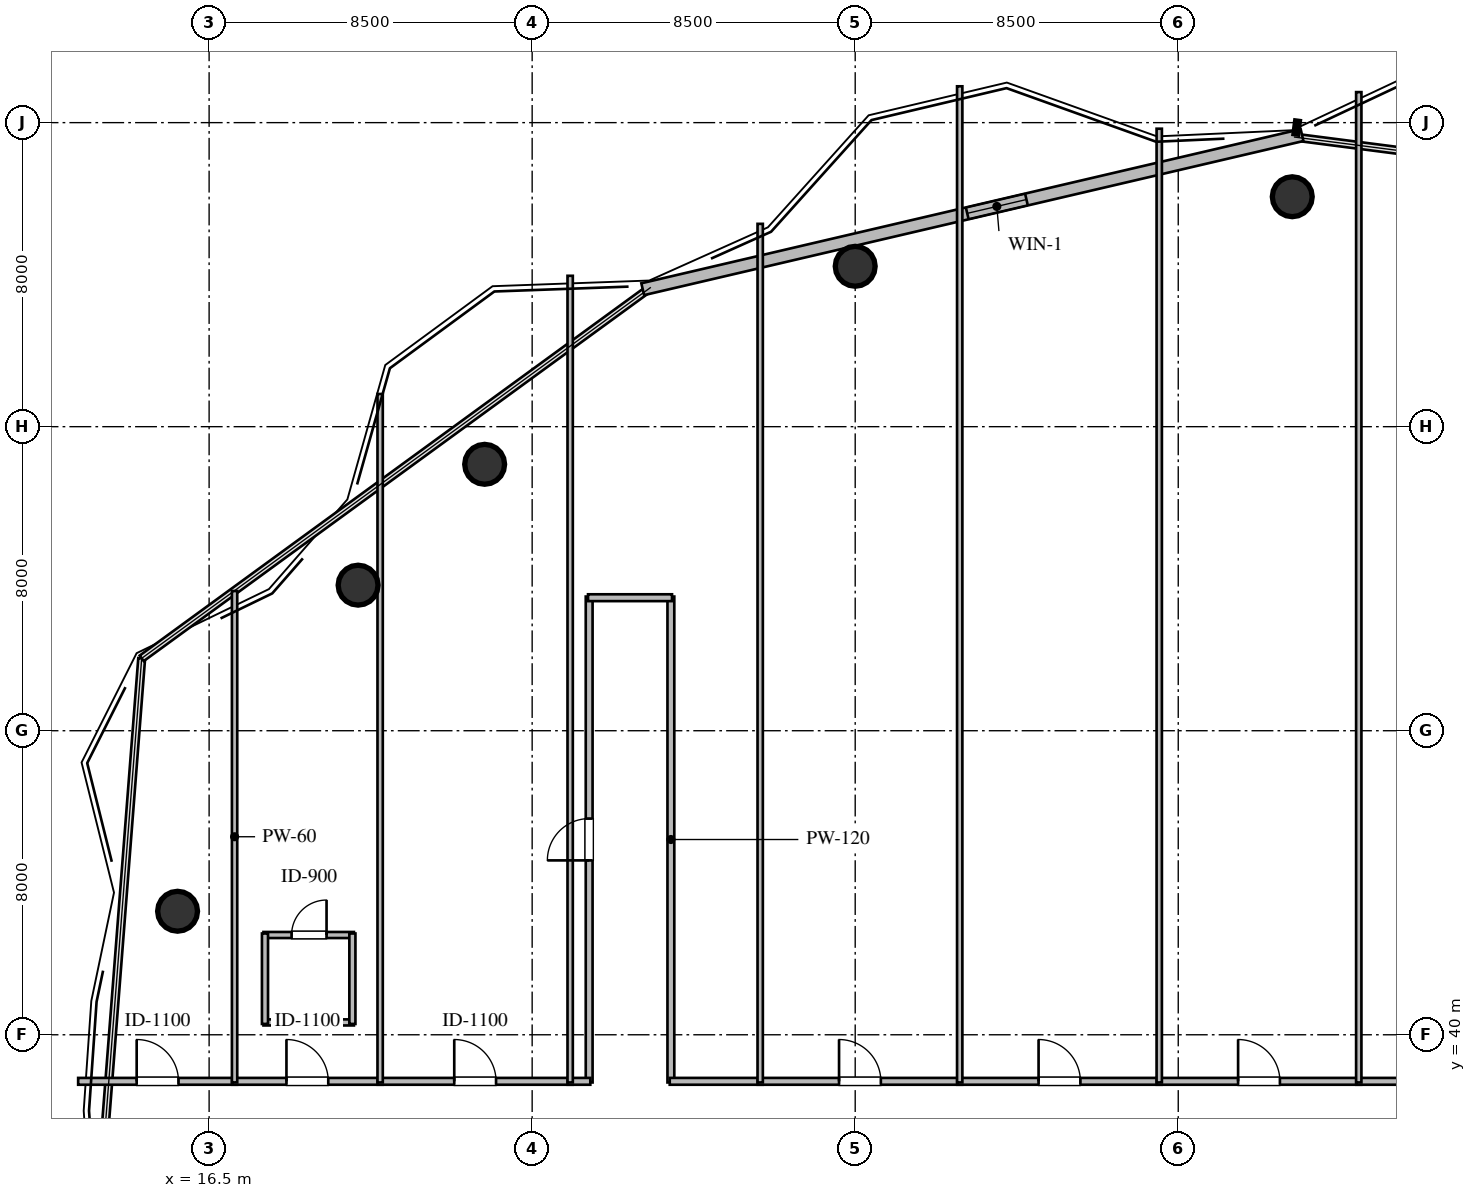
"""IFC4 building model, lengths in metres.
Left out: names, types, materials, properties, quantities, classifications, styles, units other than length and angle.
Written with IfcOpenShell. Run it as: python <this file> out.ifc"""

import sys

from ifc_helpers import new_model, si_unit, direction, frame, frame_2d, origin, origin_2d, place, context, subcontext, project, spatial, rectangle, circle, extrude, element, fill, save


model = new_model("IFC4")
c1 = context("Model", 3, precision=1e-05, world=origin(), true_north=direction((0.0, 1.0)))
c2 = subcontext(c1, "Body", "Model", "MODEL_VIEW")
j1 = project(units=[si_unit("LENGTHUNIT", "METRE"), si_unit("PLANEANGLEUNIT", "RADIAN")], contexts=[c1])
p1 = place(None, origin())
s1 = spatial("IfcSite", under=j1, at=p1, CompositionType="ELEMENT")
p2 = place(p1, origin())
s2 = spatial("IfcBuilding", under=s1, at=p2, CompositionType="ELEMENT")
p3 = place(p2, frame((0.0, 0.0, 202.8)))
s3 = spatial("IfcBuildingStorey", under=s2, at=p3, CompositionType="ELEMENT", Elevation=202.8)
for number, where, z_axis, x_axis in (
    (1, (45.0, 62.05, 0.0), (0.0, 0.0, 1.0), (1.0, 0.0, 0.0)),
    (2, (33.5, 60.22, 0.0), (0.0, 0.0, 1.0), (1.0, 0.0, 0.0)),
    (3, (23.75, 55.01, 0.0), (0.0, 0.0, 1.0), (1.0, 0.0, 0.0)),
    (4, (20.42, 51.83, 0.0), (0.0, 0.0, 1.0), (1.0, 0.0, 0.0)),
    (5, (15.67, 43.25, 0.0), (0.0, 0.0, 1.0), (1.0, 0.0, 0.0)),
):
    element("IfcColumn", number, at=place(p3, frame(where, z_axis=z_axis, x_axis=x_axis)), inside=s3, PredefinedType="COLUMN", context=c2, shape_type="SweptSolid", body=[
        extrude(circle(Radius=0.525, at=origin_2d()), origin(), (0.0, 0.0, 1.0), 3.6),
    ])
p4 = place(p3, frame((27.909, 59.617, 0.0), z_axis=(0.0, 0.0, 1.0), x_axis=(0.973753606594, 0.227604731158, 0.0)))
e6 = element("IfcWall", 6, at=p4, inside=s3, PredefinedType="STANDARD", context=c2, shape_type="SweptSolid", body=[
    extrude(rectangle(XDim=17.817, YDim=0.32, at=frame_2d((8.908, 0.0))), origin(), (0.0, 0.0, 1.0), 3.36),
])
p5 = place(p4, frame((8.769, 0.0, 1.05)))
e7 = element("IfcOpeningElement", 7, at=p5, cuts=e6, PredefinedType="OPENING", context=c2, shape_type="SweptSolid", body=[
    extrude(rectangle(XDim=1.6, YDim=1.5, at=frame_2d((0.8, 0.75))), frame((0.0, 0.17, 0.0), z_axis=(0.0, -1.0, 0.0), x_axis=(1.0, 0.0, 0.0)), (0.0, 0.0, 1.0), 0.34),
])
p6 = place(p3, frame((17.93, 40.325, 0.0), z_axis=(0.0, 0.0, 1.0), x_axis=(1.0, 0.0, 0.0)))
e8 = element("IfcWall", 8, at=p6, inside=s3, PredefinedType="PLUMBINGWALL", context=c2, shape_type="SweptSolid", body=[
    extrude(rectangle(XDim=2.38, YDim=0.16, at=frame_2d((1.19, 0.0))), origin(), (0.0, 0.0, 1.0), 3.36),
])
p7 = place(p3, frame((17.93, 42.625, 0.0), z_axis=(0.0, 0.0, 1.0), x_axis=(1.0, 0.0, 0.0)))
e9 = element("IfcWall", 9, at=p7, inside=s3, PredefinedType="PLUMBINGWALL", context=c2, shape_type="SweptSolid", body=[
    extrude(rectangle(XDim=2.38, YDim=0.16, at=frame_2d((1.19, 0.0))), origin(), (0.0, 0.0, 1.0), 3.36),
])
p8 = place(p7, frame((0.74, 0.0, 0.0)))
e10 = element("IfcOpeningElement", 10, at=p8, cuts=e9, PredefinedType="OPENING", context=c2, shape_type="SweptSolid", body=[
    extrude(rectangle(XDim=0.92, YDim=2.1, at=frame_2d((0.46, 1.05))), frame((0.0, 0.09, 0.0), z_axis=(0.0, -1.0, 0.0), x_axis=(1.0, 0.0, 0.0)), (0.0, 0.0, 1.0), 0.18),
])
for number, where, z_axis, x_axis in (
    (11, (17.97, 40.285, 0.0), (0.0, 0.0, 1.0), (0.0, 1.0, 0.0)),
    (12, (20.27, 40.285, 0.0), (0.0, 0.0, 1.0), (0.0, 1.0, 0.0)),
):
    element("IfcWall", number, at=place(p3, frame(where, z_axis=z_axis, x_axis=x_axis)), inside=s3, PredefinedType="PLUMBINGWALL", context=c2, shape_type="SweptSolid", body=[
        extrude(rectangle(XDim=2.38, YDim=0.16, at=frame_2d((1.19, 0.0))), origin(), (0.0, 0.0, 1.0), 3.36),
    ])
p9 = place(p3, frame((13.054, 38.775, 0.0), z_axis=(0.0, 0.0, 1.0), x_axis=(1.0, 0.0, 0.0)))
e13 = element("IfcWall", 13, at=p9, inside=s3, PredefinedType="PARTITIONING", context=c2, shape_type="SweptSolid", body=[
    extrude(rectangle(XDim=4.181, YDim=0.18, at=frame_2d((2.091, 0.0))), origin(), (0.0, 0.0, 1.0), 3.36),
])
p10 = place(p9, frame((1.54, 0.0, 0.0)))
e14 = element("IfcOpeningElement", 14, at=p10, cuts=e13, PredefinedType="OPENING", context=c2, shape_type="SweptSolid", body=[
    extrude(rectangle(XDim=1.1, YDim=2.1, at=frame_2d((0.55, 1.05))), frame((0.0, 0.1, 0.0), z_axis=(0.0, -1.0, 0.0), x_axis=(1.0, 0.0, 0.0)), (0.0, 0.0, 1.0), 0.2),
])
p11 = place(p3, frame((17.105, 38.775, 0.0), z_axis=(0.0, 0.0, 1.0), x_axis=(1.0, 0.0, 0.0)))
e15 = element("IfcWall", 15, at=p11, inside=s3, PredefinedType="PARTITIONING", context=c2, shape_type="SweptSolid", body=[
    extrude(rectangle(XDim=3.96, YDim=0.18, at=frame_2d((1.98, 0.0))), origin(), (0.0, 0.0, 1.0), 3.36),
])
p12 = place(p11, frame((1.43, 0.0, 0.0)))
e16 = element("IfcOpeningElement", 16, at=p12, cuts=e15, PredefinedType="OPENING", context=c2, shape_type="SweptSolid", body=[
    extrude(rectangle(XDim=1.1, YDim=2.1, at=frame_2d((0.55, 1.05))), frame((0.0, 0.1, 0.0), z_axis=(0.0, -1.0, 0.0), x_axis=(1.0, 0.0, 0.0)), (0.0, 0.0, 1.0), 0.2),
])
p13 = place(p3, frame((20.935, 38.775, 0.0), z_axis=(0.0, 0.0, 1.0), x_axis=(1.0, 0.0, 0.0)))
e17 = element("IfcWall", 17, at=p13, inside=s3, PredefinedType="PARTITIONING", context=c2, shape_type="SweptSolid", body=[
    extrude(rectangle(XDim=5.13, YDim=0.18, at=frame_2d((2.565, 0.0))), origin(), (0.0, 0.0, 1.0), 3.36),
])
p14 = place(p13, frame((2.015, 0.0, 0.0)))
e18 = element("IfcOpeningElement", 18, at=p14, cuts=e17, PredefinedType="OPENING", context=c2, shape_type="SweptSolid", body=[
    extrude(rectangle(XDim=1.1, YDim=2.1, at=frame_2d((0.55, 1.05))), frame((0.0, 0.1, 0.0), z_axis=(0.0, -1.0, 0.0), x_axis=(1.0, 0.0, 0.0)), (0.0, 0.0, 1.0), 0.2),
])
p15 = place(p3, frame((26.5, 38.745, 0.0), z_axis=(0.0, 0.0, 1.0), x_axis=(0.0, 1.0, 0.0)))
e19 = element("IfcWall", 19, at=p15, inside=s3, PredefinedType="PARTITIONING", context=c2, shape_type="SweptSolid", body=[
    extrude(rectangle(XDim=12.785, YDim=0.18, at=frame_2d((6.393, 0.0))), origin(), (0.0, 0.0, 1.0), 3.36),
])
p16 = place(p15, frame((5.843, 0.0, 0.0)))
e20 = element("IfcOpeningElement", 20, at=p16, cuts=e19, PredefinedType="OPENING", context=c2, shape_type="SweptSolid", body=[
    extrude(rectangle(XDim=1.1, YDim=2.1, at=frame_2d((0.55, 1.05))), frame((0.0, 0.1, 0.0), z_axis=(0.0, -1.0, 0.0), x_axis=(1.0, 0.0, 0.0)), (0.0, 0.0, 1.0), 0.2),
])
p17 = place(p3, frame((28.65, 51.53, 0.0), z_axis=(0.0, 0.0, 1.0), x_axis=(0.0, -1.0, 0.0)))
e21 = element("IfcWall", 21, at=p17, inside=s3, PredefinedType="PARTITIONING", context=c2, shape_type="SweptSolid", body=[
    extrude(rectangle(XDim=12.785, YDim=0.18, at=frame_2d((6.393, 0.0))), origin(), (0.0, 0.0, 1.0), 3.36),
])
p18 = place(p3, frame((28.62, 38.775, 0.0), z_axis=(0.0, 0.0, 1.0), x_axis=(1.0, 0.0, 0.0)))
e22 = element("IfcWall", 22, at=p18, inside=s3, PredefinedType="PARTITIONING", context=c2, shape_type="SweptSolid", body=[
    extrude(rectangle(XDim=2.445, YDim=0.18, at=frame_2d((1.222, 0.0))), origin(), (0.0, 0.0, 1.0), 3.36),
])
p19 = place(p3, frame((26.47, 51.5, 0.0), z_axis=(0.0, 0.0, 1.0), x_axis=(1.0, 0.0, 0.0)))
e23 = element("IfcWall", 23, at=p19, inside=s3, PredefinedType="PARTITIONING", context=c2, shape_type="SweptSolid", body=[
    extrude(rectangle(XDim=2.21, YDim=0.18, at=frame_2d((1.105, 0.0))), origin(), (0.0, 0.0, 1.0), 3.36),
])
p20 = place(p3, frame((25.935, 38.775, 0.0), z_axis=(0.0, 0.0, 1.0), x_axis=(1.0, 0.0, 0.0)))
e24 = element("IfcWall", 24, at=p20, inside=s3, PredefinedType="PARTITIONING", context=c2, shape_type="SweptSolid", body=[
    extrude(rectangle(XDim=0.595, YDim=0.18, at=frame_2d((0.297, 0.0))), origin(), (0.0, 0.0, 1.0), 3.36),
])
p21 = place(p3, frame((30.935, 38.775, 0.0), z_axis=(0.0, 0.0, 1.0), x_axis=(1.0, 0.0, 0.0)))
e25 = element("IfcWall", 25, at=p21, inside=s3, PredefinedType="PARTITIONING", context=c2, shape_type="SweptSolid", body=[
    extrude(rectangle(XDim=5.38, YDim=0.18, at=frame_2d((2.69, 0.0))), origin(), (0.0, 0.0, 1.0), 3.36),
])
p22 = place(p21, frame((2.14, 0.0, 0.0)))
e26 = element("IfcOpeningElement", 26, at=p22, cuts=e25, PredefinedType="OPENING", context=c2, shape_type="SweptSolid", body=[
    extrude(rectangle(XDim=1.1, YDim=2.1, at=frame_2d((0.55, 1.05))), frame((0.0, 0.1, 0.0), z_axis=(0.0, -1.0, 0.0), x_axis=(1.0, 0.0, 0.0)), (0.0, 0.0, 1.0), 0.2),
])
p23 = place(p3, frame((36.185, 38.775, 0.0), z_axis=(0.0, 0.0, 1.0), x_axis=(1.0, 0.0, 0.0)))
e27 = element("IfcWall", 27, at=p23, inside=s3, PredefinedType="PARTITIONING", context=c2, shape_type="SweptSolid", body=[
    extrude(rectangle(XDim=5.38, YDim=0.18, at=frame_2d((2.69, 0.0))), origin(), (0.0, 0.0, 1.0), 3.36),
])
p24 = place(p23, frame((2.14, 0.0, 0.0)))
e28 = element("IfcOpeningElement", 28, at=p24, cuts=e27, PredefinedType="OPENING", context=c2, shape_type="SweptSolid", body=[
    extrude(rectangle(XDim=1.1, YDim=2.1, at=frame_2d((0.55, 1.05))), frame((0.0, 0.1, 0.0), z_axis=(0.0, -1.0, 0.0), x_axis=(1.0, 0.0, 0.0)), (0.0, 0.0, 1.0), 0.2),
])
p25 = place(p3, frame((41.435, 38.775, 0.0), z_axis=(0.0, 0.0, 1.0), x_axis=(1.0, 0.0, 0.0)))
e29 = element("IfcWall", 29, at=p25, inside=s3, PredefinedType="PARTITIONING", context=c2, shape_type="SweptSolid", body=[
    extrude(rectangle(XDim=5.38, YDim=0.18, at=frame_2d((2.69, 0.0))), origin(), (0.0, 0.0, 1.0), 3.36),
])
p26 = place(p25, frame((2.14, 0.0, 0.0)))
e30 = element("IfcOpeningElement", 30, at=p26, cuts=e29, PredefinedType="OPENING", context=c2, shape_type="SweptSolid", body=[
    extrude(rectangle(XDim=1.1, YDim=2.1, at=frame_2d((0.55, 1.05))), frame((0.0, 0.1, 0.0), z_axis=(0.0, -1.0, 0.0), x_axis=(1.0, 0.0, 0.0)), (0.0, 0.0, 1.0), 0.2),
])
p27 = place(p3, frame((46.685, 38.775, 0.0), z_axis=(0.0, 0.0, 1.0), x_axis=(1.0, 0.0, 0.0)))
e31 = element("IfcWall", 31, at=p27, inside=s3, PredefinedType="PARTITIONING", context=c2, shape_type="SweptSolid", body=[
    extrude(rectangle(XDim=5.38, YDim=0.18, at=frame_2d((2.69, 0.0))), origin(), (0.0, 0.0, 1.0), 3.36),
])
p28 = place(p27, frame((2.14, 0.0, 0.0)))
e32 = element("IfcOpeningElement", 32, at=p28, cuts=e31, PredefinedType="OPENING", context=c2, shape_type="SweptSolid", body=[
    extrude(rectangle(XDim=1.1, YDim=2.1, at=frame_2d((0.55, 1.05))), frame((0.0, 0.1, 0.0), z_axis=(0.0, -1.0, 0.0), x_axis=(1.0, 0.0, 0.0)), (0.0, 0.0, 1.0), 0.2),
])
p29 = place(p3, frame((17.17, 51.676, 0.0), z_axis=(0.0, 0.0, 1.0), x_axis=(0.0, -1.0, 0.0)))
e33 = element("IfcWall", 33, at=p29, inside=s3, PredefinedType="PARTITIONING", context=c2, shape_type="SweptSolid", body=[
    extrude(rectangle(XDim=12.931, YDim=0.14, at=frame_2d((6.465, 0.0))), origin(), (0.0, 0.0, 1.0), 2.817),
])
p30 = place(p3, frame((21.0, 56.86, 0.0), z_axis=(0.0, 0.0, 1.0), x_axis=(0.0, -1.0, 0.0)))
e34 = element("IfcWall", 34, at=p30, inside=s3, PredefinedType="PARTITIONING", context=c2, shape_type="SweptSolid", body=[
    extrude(rectangle(XDim=18.115, YDim=0.14, at=frame_2d((9.058, 0.0))), origin(), (0.0, 0.0, 1.0), 2.89),
])
p31 = place(p3, frame((26.0, 59.97, 0.0), z_axis=(0.0, 0.0, 1.0), x_axis=(0.0, -1.0, 0.0)))
e35 = element("IfcWall", 35, at=p31, inside=s3, PredefinedType="PARTITIONING", context=c2, shape_type="SweptSolid", body=[
    extrude(rectangle(XDim=21.225, YDim=0.14, at=frame_2d((10.612, 0.0))), origin(), (0.0, 0.0, 1.0), 3.36),
])
p32 = place(p3, frame((31.0, 61.337, 0.0), z_axis=(0.0, 0.0, 1.0), x_axis=(0.0, -1.0, 0.0)))
e36 = element("IfcWall", 36, at=p32, inside=s3, PredefinedType="PARTITIONING", context=c2, shape_type="SweptSolid", body=[
    extrude(rectangle(XDim=22.592, YDim=0.14, at=frame_2d((11.296, 0.0))), origin(), (0.0, 0.0, 1.0), 3.36),
])
p33 = place(p3, frame((36.25, 64.956, 0.0), z_axis=(0.0, 0.0, 1.0), x_axis=(0.0, -1.0, 0.0)))
e37 = element("IfcWall", 37, at=p33, inside=s3, PredefinedType="PARTITIONING", context=c2, shape_type="SweptSolid", body=[
    extrude(rectangle(XDim=26.211, YDim=0.14, at=frame_2d((13.105, 0.0))), origin(), (0.0, 0.0, 1.0), 2.89),
])
p34 = place(p3, frame((41.5, 63.84, 0.0), z_axis=(0.0, 0.0, 1.0), x_axis=(0.0, -1.0, 0.0)))
e38 = element("IfcWall", 38, at=p34, inside=s3, PredefinedType="PARTITIONING", context=c2, shape_type="SweptSolid", body=[
    extrude(rectangle(XDim=25.095, YDim=0.14, at=frame_2d((12.547, 0.0))), origin(), (0.0, 0.0, 1.0), 3.36),
])
p35 = place(p3, frame((46.75, 64.803, 0.0), z_axis=(0.0, 0.0, 1.0), x_axis=(0.0, -1.0, 0.0)))
e39 = element("IfcWall", 39, at=p35, inside=s3, PredefinedType="PARTITIONING", context=c2, shape_type="SweptSolid", body=[
    extrude(rectangle(XDim=26.058, YDim=0.14, at=frame_2d((13.029, 0.0))), origin(), (0.0, 0.0, 1.0), 3.36),
])
p36 = place(p5, origin())
e40 = element("IfcWindow", 40, at=p36, inside=s3, PartitioningType="SINGLE_PANEL", PredefinedType="WINDOW", context=c2, shape_type="SweptSolid", body=[
    extrude(rectangle(XDim=1.6, YDim=1.5, at=frame_2d((0.8, 0.75))), frame((0.0, 0.03, 0.0), z_axis=(0.0, -1.0, 0.0), x_axis=(1.0, 0.0, 0.0)), (0.0, 0.0, 1.0), 0.06),
])
fill(e7, e40)
p37 = place(p8, origin())
e41 = element("IfcDoor", 41, at=p37, inside=s3, OperationType="SINGLE_SWING_RIGHT", PredefinedType="DOOR", context=c2, shape_type="SweptSolid", body=[
    extrude(rectangle(XDim=0.92, YDim=2.1, at=frame_2d((0.46, 1.05))), frame((0.0, 0.025, 0.0), z_axis=(0.0, -1.0, 0.0), x_axis=(1.0, 0.0, 0.0)), (0.0, 0.0, 1.0), 0.05),
])
fill(e10, e41)
p38 = place(p10, origin())
e42 = element("IfcDoor", 42, at=p38, inside=s3, OperationType="SINGLE_SWING_LEFT", PredefinedType="DOOR", context=c2, shape_type="SweptSolid", body=[
    extrude(rectangle(XDim=1.1, YDim=2.1, at=frame_2d((0.55, 1.05))), frame((0.0, 0.025, 0.0), z_axis=(0.0, -1.0, 0.0), x_axis=(1.0, 0.0, 0.0)), (0.0, 0.0, 1.0), 0.05),
])
fill(e14, e42)
p39 = place(p12, origin())
e43 = element("IfcDoor", 43, at=p39, inside=s3, OperationType="SINGLE_SWING_LEFT", PredefinedType="DOOR", context=c2, shape_type="SweptSolid", body=[
    extrude(rectangle(XDim=1.1, YDim=2.1, at=frame_2d((0.55, 1.05))), frame((0.0, 0.025, 0.0), z_axis=(0.0, -1.0, 0.0), x_axis=(1.0, 0.0, 0.0)), (0.0, 0.0, 1.0), 0.05),
])
fill(e16, e43)
p40 = place(p14, origin())
e44 = element("IfcDoor", 44, at=p40, inside=s3, OperationType="SINGLE_SWING_LEFT", PredefinedType="DOOR", context=c2, shape_type="SweptSolid", body=[
    extrude(rectangle(XDim=1.1, YDim=2.1, at=frame_2d((0.55, 1.05))), frame((0.0, 0.025, 0.0), z_axis=(0.0, -1.0, 0.0), x_axis=(1.0, 0.0, 0.0)), (0.0, 0.0, 1.0), 0.05),
])
fill(e18, e44)
p41 = place(p16, origin())
e45 = element("IfcDoor", 45, at=p41, inside=s3, OperationType="SINGLE_SWING_LEFT", PredefinedType="DOOR", context=c2, shape_type="SweptSolid", body=[
    extrude(rectangle(XDim=1.1, YDim=2.1, at=frame_2d((0.55, 1.05))), frame((0.0, 0.025, 0.0), z_axis=(0.0, -1.0, 0.0), x_axis=(1.0, 0.0, 0.0)), (0.0, 0.0, 1.0), 0.05),
])
fill(e20, e45)
p42 = place(p22, origin())
e46 = element("IfcDoor", 46, at=p42, inside=s3, OperationType="SINGLE_SWING_LEFT", PredefinedType="DOOR", context=c2, shape_type="SweptSolid", body=[
    extrude(rectangle(XDim=1.1, YDim=2.1, at=frame_2d((0.55, 1.05))), frame((0.0, 0.025, 0.0), z_axis=(0.0, -1.0, 0.0), x_axis=(1.0, 0.0, 0.0)), (0.0, 0.0, 1.0), 0.05),
])
fill(e26, e46)
p43 = place(p24, origin())
e47 = element("IfcDoor", 47, at=p43, inside=s3, OperationType="SINGLE_SWING_LEFT", PredefinedType="DOOR", context=c2, shape_type="SweptSolid", body=[
    extrude(rectangle(XDim=1.1, YDim=2.1, at=frame_2d((0.55, 1.05))), frame((0.0, 0.025, 0.0), z_axis=(0.0, -1.0, 0.0), x_axis=(1.0, 0.0, 0.0)), (0.0, 0.0, 1.0), 0.05),
])
fill(e28, e47)
p44 = place(p26, origin())
e48 = element("IfcDoor", 48, at=p44, inside=s3, OperationType="SINGLE_SWING_LEFT", PredefinedType="DOOR", context=c2, shape_type="SweptSolid", body=[
    extrude(rectangle(XDim=1.1, YDim=2.1, at=frame_2d((0.55, 1.05))), frame((0.0, 0.025, 0.0), z_axis=(0.0, -1.0, 0.0), x_axis=(1.0, 0.0, 0.0)), (0.0, 0.0, 1.0), 0.05),
])
fill(e30, e48)
save(model, sys.argv[1])
